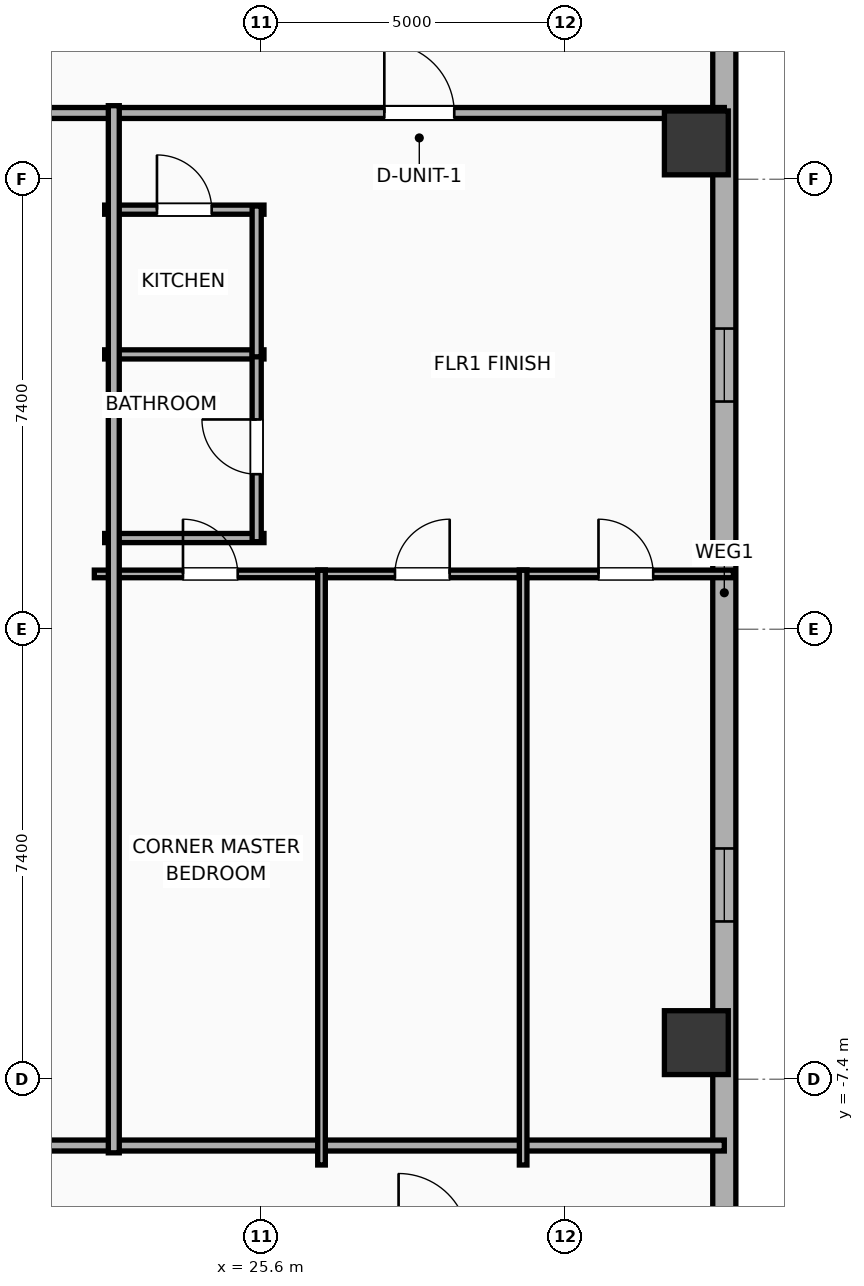
"""IFC4 building model, lengths in metres.
Left out: names, types, materials, properties, quantities, classifications, styles, units other than length and angle.
Written with IfcOpenShell. Run it as: python <this file> out.ifc"""

import sys

from ifc_helpers import new_model, si_unit, direction, frame, frame_2d, origin, origin_2d, place, context, subcontext, project, spatial, rectangle, hollow_rectangle, extrude, element, fill, save


model = new_model("IFC4")
c1 = context("Model", 3, precision=1e-05, world=origin(), true_north=direction((0.0, 1.0)))
c2 = subcontext(c1, "Body", "Model", "MODEL_VIEW")
j1 = project(units=[si_unit("LENGTHUNIT", "METRE"), si_unit("PLANEANGLEUNIT", "RADIAN")], contexts=[c1])
p1 = place(None, origin())
s1 = spatial("IfcSite", under=j1, at=p1, CompositionType="ELEMENT")
p2 = place(p1, origin())
s2 = spatial("IfcBuilding", under=s1, at=p2, CompositionType="ELEMENT")
p3 = place(p2, frame((0.0, 0.0, 136.5)))
s3 = spatial("IfcBuildingStorey", under=s2, at=p3, CompositionType="ELEMENT", Elevation=136.5)
for number, where, z_axis, x_axis in (
    (1, (32.75, -6.798, 0.0), (0.0, 0.0, 1.0), (1.0, 0.0, 0.0)),
    (2, (32.75, 7.998, 0.0), (0.0, 0.0, 1.0), (1.0, 0.0, 0.0)),
):
    element("IfcColumn", number, at=place(p3, frame(where, z_axis=z_axis, x_axis=x_axis)), inside=s3, PredefinedType="COLUMN", context=c2, shape_type="SweptSolid", body=[
        extrude(hollow_rectangle(XDim=1.05, YDim=1.05, WallThickness=0.036, at=origin_2d()), origin(), (0.0, 0.0, 1.0), 3.865),
    ])
p4 = place(p3, frame((33.21, 17.781, 0.0), z_axis=(0.0, 0.0, 1.0), x_axis=(0.0, -1.0, 0.0)))
e3 = element("IfcWall", 3, at=p4, inside=s3, PredefinedType="ELEMENTEDWALL", context=c2, shape_type="SweptSolid", body=[
    extrude(rectangle(XDim=34.363, YDim=0.38, at=frame_2d((17.181, 0.0))), origin(), (0.0, 0.0, 1.0), 2.39),
])
p5 = place(p4, frame((31.687, 0.0, 0.55)))
e4 = element("IfcOpeningElement", 4, at=p5, cuts=e3, PredefinedType="OPENING", context=c2, shape_type="SweptSolid", body=[
    extrude(rectangle(XDim=1.2, YDim=1.15, at=frame_2d((0.6, 0.575))), frame((0.0, 0.2, 0.0), z_axis=(0.0, -1.0, 0.0), x_axis=(1.0, 0.0, 0.0)), (0.0, 0.0, 1.0), 0.4),
])
p6 = place(p4, frame((12.836, 0.0, 0.55)))
e5 = element("IfcOpeningElement", 5, at=p6, cuts=e3, PredefinedType="OPENING", context=c2, shape_type="SweptSolid", body=[
    extrude(rectangle(XDim=1.2, YDim=1.15, at=frame_2d((0.6, 0.575))), frame((0.0, 0.2, 0.0), z_axis=(0.0, -1.0, 0.0), x_axis=(1.0, 0.0, 0.0)), (0.0, 0.0, 1.0), 0.4),
])
p7 = place(p4, frame((21.386, 0.0, 0.55)))
e6 = element("IfcOpeningElement", 6, at=p7, cuts=e3, PredefinedType="OPENING", context=c2, shape_type="SweptSolid", body=[
    extrude(rectangle(XDim=1.2, YDim=1.15, at=frame_2d((0.6, 0.575))), frame((0.0, 0.2, 0.0), z_axis=(0.0, -1.0, 0.0), x_axis=(1.0, 0.0, 0.0)), (0.0, 0.0, 1.0), 0.4),
])
p8 = place(p3, frame((9.88, 8.49, 0.0), z_axis=(0.0, 0.0, 1.0), x_axis=(1.0, 0.0, 0.0)))
e7 = element("IfcWall", 7, at=p8, inside=s3, PredefinedType="PARTITIONING", context=c2, shape_type="SweptSolid", body=[
    extrude(rectangle(XDim=23.33, YDim=0.18, at=frame_2d((11.665, 0.0))), origin(), (0.0, 0.0, 1.0), 2.39),
])
p9 = place(p8, frame((17.739, 0.0, 0.0)))
e8 = element("IfcOpeningElement", 8, at=p9, cuts=e7, PredefinedType="OPENING", context=c2, shape_type="SweptSolid", body=[
    extrude(rectangle(XDim=1.15, YDim=2.05, at=frame_2d((0.575, 1.025))), frame((0.0, 0.1, 0.0), z_axis=(0.0, -1.0, 0.0), x_axis=(1.0, 0.0, 0.0)), (0.0, 0.0, 1.0), 0.2),
])
p10 = place(p3, frame((9.88, -8.49, 0.0), z_axis=(0.0, 0.0, 1.0), x_axis=(1.0, 0.0, 0.0)))
e9 = element("IfcWall", 9, at=p10, inside=s3, PredefinedType="PARTITIONING", context=c2, shape_type="SweptSolid", body=[
    extrude(rectangle(XDim=23.33, YDim=0.18, at=frame_2d((11.665, 0.0))), origin(), (0.0, 0.0, 1.0), 3.5),
])
p11 = place(p3, frame((23.02, 6.9, 0.0), z_axis=(0.0, 0.0, 1.0), x_axis=(1.0, 0.0, 0.0)))
e10 = element("IfcWall", 10, at=p11, inside=s3, PredefinedType="PLUMBINGWALL", context=c2, shape_type="SweptSolid", body=[
    extrude(rectangle(XDim=2.62, YDim=0.15, at=frame_2d((1.31, 0.0))), origin(), (0.0, 0.0, 1.0), 3.5),
])
p12 = place(p11, frame((0.86, 0.0, 0.0)))
e11 = element("IfcOpeningElement", 11, at=p12, cuts=e10, PredefinedType="OPENING", context=c2, shape_type="SweptSolid", body=[
    extrude(rectangle(XDim=0.9, YDim=2.05, at=frame_2d((0.45, 1.025))), frame((0.0, 0.085, 0.0), z_axis=(0.0, -1.0, 0.0), x_axis=(1.0, 0.0, 0.0)), (0.0, 0.0, 1.0), 0.17),
])
for number, where, z_axis, x_axis in (
    (12, (23.02, 4.52, 0.0), (0.0, 0.0, 1.0), (1.0, 0.0, 0.0)),
    (13, (23.02, 1.5, 0.0), (0.0, 0.0, 1.0), (1.0, 0.0, 0.0)),
):
    element("IfcWall", number, at=place(p3, frame(where, z_axis=z_axis, x_axis=x_axis)), inside=s3, PredefinedType="PLUMBINGWALL", context=c2, shape_type="SweptSolid", body=[
        extrude(rectangle(XDim=2.62, YDim=0.15, at=frame_2d((1.31, 0.0))), origin(), (0.0, 0.0, 1.0), 3.5),
    ])
p13 = place(p3, frame((25.52, 1.44, 0.0), z_axis=(0.0, 0.0, 1.0), x_axis=(0.0, 1.0, 0.0)))
e14 = element("IfcWall", 14, at=p13, inside=s3, PredefinedType="PLUMBINGWALL", context=c2, shape_type="SweptSolid", body=[
    extrude(rectangle(XDim=3.12, YDim=0.15, at=frame_2d((1.56, 0.0))), origin(), (0.0, 0.0, 1.0), 2.39),
])
p14 = place(p13, frame((1.11, 0.0, 0.0)))
e15 = element("IfcOpeningElement", 15, at=p14, cuts=e14, PredefinedType="OPENING", context=c2, shape_type="SweptSolid", body=[
    extrude(rectangle(XDim=0.9, YDim=2.05, at=frame_2d((0.45, 1.025))), frame((0.0, 0.085, 0.0), z_axis=(0.0, -1.0, 0.0), x_axis=(1.0, 0.0, 0.0)), (0.0, 0.0, 1.0), 0.17),
])
p15 = place(p3, frame((25.52, 4.48, 0.0), z_axis=(0.0, 0.0, 1.0), x_axis=(0.0, 1.0, 0.0)))
e16 = element("IfcWall", 16, at=p15, inside=s3, PredefinedType="PLUMBINGWALL", context=c2, shape_type="SweptSolid", body=[
    extrude(rectangle(XDim=2.48, YDim=0.15, at=frame_2d((1.24, 0.0))), origin(), (0.0, 0.0, 1.0), 2.39),
])
p16 = place(p3, frame((22.85, 0.91, 0.0), z_axis=(0.0, 0.0, 1.0), x_axis=(1.0, 0.0, 0.0)))
e17 = element("IfcWall", 17, at=p16, inside=s3, PredefinedType="PARTITIONING", context=c2, shape_type="SweptSolid", body=[
    extrude(rectangle(XDim=3.798, YDim=0.125, at=frame_2d((1.899, 0.0))), origin(), (0.0, 0.0, 1.0), 3.5),
])
p17 = place(p16, frame((1.458, 0.0, 0.0)))
e18 = element("IfcOpeningElement", 18, at=p17, cuts=e17, PredefinedType="OPENING", context=c2, shape_type="SweptSolid", body=[
    extrude(rectangle(XDim=0.9, YDim=2.05, at=frame_2d((0.45, 1.025))), frame((0.0, 0.073, 0.0), z_axis=(0.0, -1.0, 0.0), x_axis=(1.0, 0.0, 0.0)), (0.0, 0.0, 1.0), 0.145),
])
p18 = place(p3, frame((26.523, 0.91, 0.0), z_axis=(0.0, 0.0, 1.0), x_axis=(1.0, 0.0, 0.0)))
e19 = element("IfcWall", 19, at=p18, inside=s3, PredefinedType="PARTITIONING", context=c2, shape_type="SweptSolid", body=[
    extrude(rectangle(XDim=3.441, YDim=0.125, at=frame_2d((1.721, 0.0))), origin(), (0.0, 0.0, 1.0), 3.5),
])
p19 = place(p18, frame((1.271, 0.0, 0.0)))
e20 = element("IfcOpeningElement", 20, at=p19, cuts=e19, PredefinedType="OPENING", context=c2, shape_type="SweptSolid", body=[
    extrude(rectangle(XDim=0.9, YDim=2.05, at=frame_2d((0.45, 1.025))), frame((0.0, 0.073, 0.0), z_axis=(0.0, -1.0, 0.0), x_axis=(1.0, 0.0, 0.0)), (0.0, 0.0, 1.0), 0.145),
])
p20 = place(p3, frame((29.84, 0.91, 0.0), z_axis=(0.0, 0.0, 1.0), x_axis=(1.0, 0.0, 0.0)))
e21 = element("IfcWall", 21, at=p20, inside=s3, PredefinedType="PARTITIONING", context=c2, shape_type="SweptSolid", body=[
    extrude(rectangle(XDim=3.521, YDim=0.125, at=frame_2d((1.76, 0.0))), origin(), (0.0, 0.0, 1.0), 3.5),
])
p21 = place(p20, frame((1.302, 0.0, 0.0)))
e22 = element("IfcOpeningElement", 22, at=p21, cuts=e21, PredefinedType="OPENING", context=c2, shape_type="SweptSolid", body=[
    extrude(rectangle(XDim=0.9, YDim=2.05, at=frame_2d((0.45, 1.025))), frame((0.0, 0.073, 0.0), z_axis=(0.0, -1.0, 0.0), x_axis=(1.0, 0.0, 0.0)), (0.0, 0.0, 1.0), 0.145),
])
p22 = place(p3, frame((29.902, -8.81, 0.0), z_axis=(0.0, 0.0, 1.0), x_axis=(0.0, 1.0, 0.0)))
e23 = element("IfcWall", 23, at=p22, inside=s3, PredefinedType="PARTITIONING", context=c2, shape_type="SweptSolid", body=[
    extrude(rectangle(XDim=9.78, YDim=0.125, at=frame_2d((4.89, 0.0))), origin(), (0.0, 0.0, 1.0), 3.5),
])
p23 = place(p3, frame((26.586, -8.81, 0.0), z_axis=(0.0, 0.0, 1.0), x_axis=(0.0, 1.0, 0.0)))
e24 = element("IfcWall", 24, at=p23, inside=s3, PredefinedType="PARTITIONING", context=c2, shape_type="SweptSolid", body=[
    extrude(rectangle(XDim=9.78, YDim=0.125, at=frame_2d((4.89, 0.0))), origin(), (0.0, 0.0, 1.0), 2.39),
])
p24 = place(p3, frame((23.17, -8.61, 0.0), z_axis=(0.0, 0.0, 1.0), x_axis=(0.0, 1.0, 0.0)))
e25 = element("IfcWall", 25, at=p24, inside=s3, PredefinedType="PARTITIONING", context=c2, shape_type="SweptSolid", body=[
    extrude(rectangle(XDim=17.22, YDim=0.18, at=frame_2d((8.61, 0.0))), origin(), (0.0, 0.0, 1.0), 3.5),
])
p25 = place(p6, origin())
e26 = element("IfcWindow", 26, at=p25, inside=s3, PartitioningType="SINGLE_PANEL", PredefinedType="WINDOW", context=c2, shape_type="SweptSolid", body=[
    extrude(rectangle(XDim=1.2, YDim=1.15, at=frame_2d((0.6, 0.575))), frame((0.0, 0.03, 0.0), z_axis=(0.0, -1.0, 0.0), x_axis=(1.0, 0.0, 0.0)), (0.0, 0.0, 1.0), 0.06),
])
fill(e5, e26)
p26 = place(p7, origin())
e27 = element("IfcWindow", 27, at=p26, inside=s3, PartitioningType="SINGLE_PANEL", PredefinedType="WINDOW", context=c2, shape_type="SweptSolid", body=[
    extrude(rectangle(XDim=1.2, YDim=1.15, at=frame_2d((0.6, 0.575))), frame((0.0, 0.03, 0.0), z_axis=(0.0, -1.0, 0.0), x_axis=(1.0, 0.0, 0.0)), (0.0, 0.0, 1.0), 0.06),
])
fill(e6, e27)
p27 = place(p9, origin())
e28 = element("IfcDoor", 28, at=p27, inside=s3, OperationType="SINGLE_SWING_LEFT", PredefinedType="DOOR", context=c2, shape_type="SweptSolid", body=[
    extrude(rectangle(XDim=1.15, YDim=2.05, at=frame_2d((0.575, 1.025))), frame((0.0, 0.025, 0.0), z_axis=(0.0, -1.0, 0.0), x_axis=(1.0, 0.0, 0.0)), (0.0, 0.0, 1.0), 0.05),
])
fill(e8, e28)
p28 = place(p12, origin())
e29 = element("IfcDoor", 29, at=p28, inside=s3, OperationType="SINGLE_SWING_LEFT", PredefinedType="DOOR", context=c2, shape_type="SweptSolid", body=[
    extrude(rectangle(XDim=0.9, YDim=2.05, at=frame_2d((0.45, 1.025))), frame((0.0, 0.025, 0.0), z_axis=(0.0, -1.0, 0.0), x_axis=(1.0, 0.0, 0.0)), (0.0, 0.0, 1.0), 0.05),
])
fill(e11, e29)
p29 = place(p14, origin())
e30 = element("IfcDoor", 30, at=p29, inside=s3, OperationType="SINGLE_SWING_RIGHT", PredefinedType="DOOR", context=c2, shape_type="SweptSolid", body=[
    extrude(rectangle(XDim=0.9, YDim=2.05, at=frame_2d((0.45, 1.025))), frame((0.0, 0.025, 0.0), z_axis=(0.0, -1.0, 0.0), x_axis=(1.0, 0.0, 0.0)), (0.0, 0.0, 1.0), 0.05),
])
fill(e15, e30)
p30 = place(p17, origin())
e31 = element("IfcDoor", 31, at=p30, inside=s3, OperationType="SINGLE_SWING_LEFT", PredefinedType="DOOR", context=c2, shape_type="SweptSolid", body=[
    extrude(rectangle(XDim=0.9, YDim=2.05, at=frame_2d((0.45, 1.025))), frame((0.0, 0.025, 0.0), z_axis=(0.0, -1.0, 0.0), x_axis=(1.0, 0.0, 0.0)), (0.0, 0.0, 1.0), 0.05),
])
fill(e18, e31)
p31 = place(p19, origin())
e32 = element("IfcDoor", 32, at=p31, inside=s3, OperationType="SINGLE_SWING_RIGHT", PredefinedType="DOOR", context=c2, shape_type="SweptSolid", body=[
    extrude(rectangle(XDim=0.9, YDim=2.05, at=frame_2d((0.45, 1.025))), frame((0.0, 0.025, 0.0), z_axis=(0.0, -1.0, 0.0), x_axis=(1.0, 0.0, 0.0)), (0.0, 0.0, 1.0), 0.05),
])
fill(e20, e32)
p32 = place(p21, origin())
e33 = element("IfcDoor", 33, at=p32, inside=s3, OperationType="SINGLE_SWING_LEFT", PredefinedType="DOOR", context=c2, shape_type="SweptSolid", body=[
    extrude(rectangle(XDim=0.9, YDim=2.05, at=frame_2d((0.45, 1.025))), frame((0.0, 0.025, 0.0), z_axis=(0.0, -1.0, 0.0), x_axis=(1.0, 0.0, 0.0)), (0.0, 0.0, 1.0), 0.05),
])
fill(e22, e33)
save(model, sys.argv[1])
